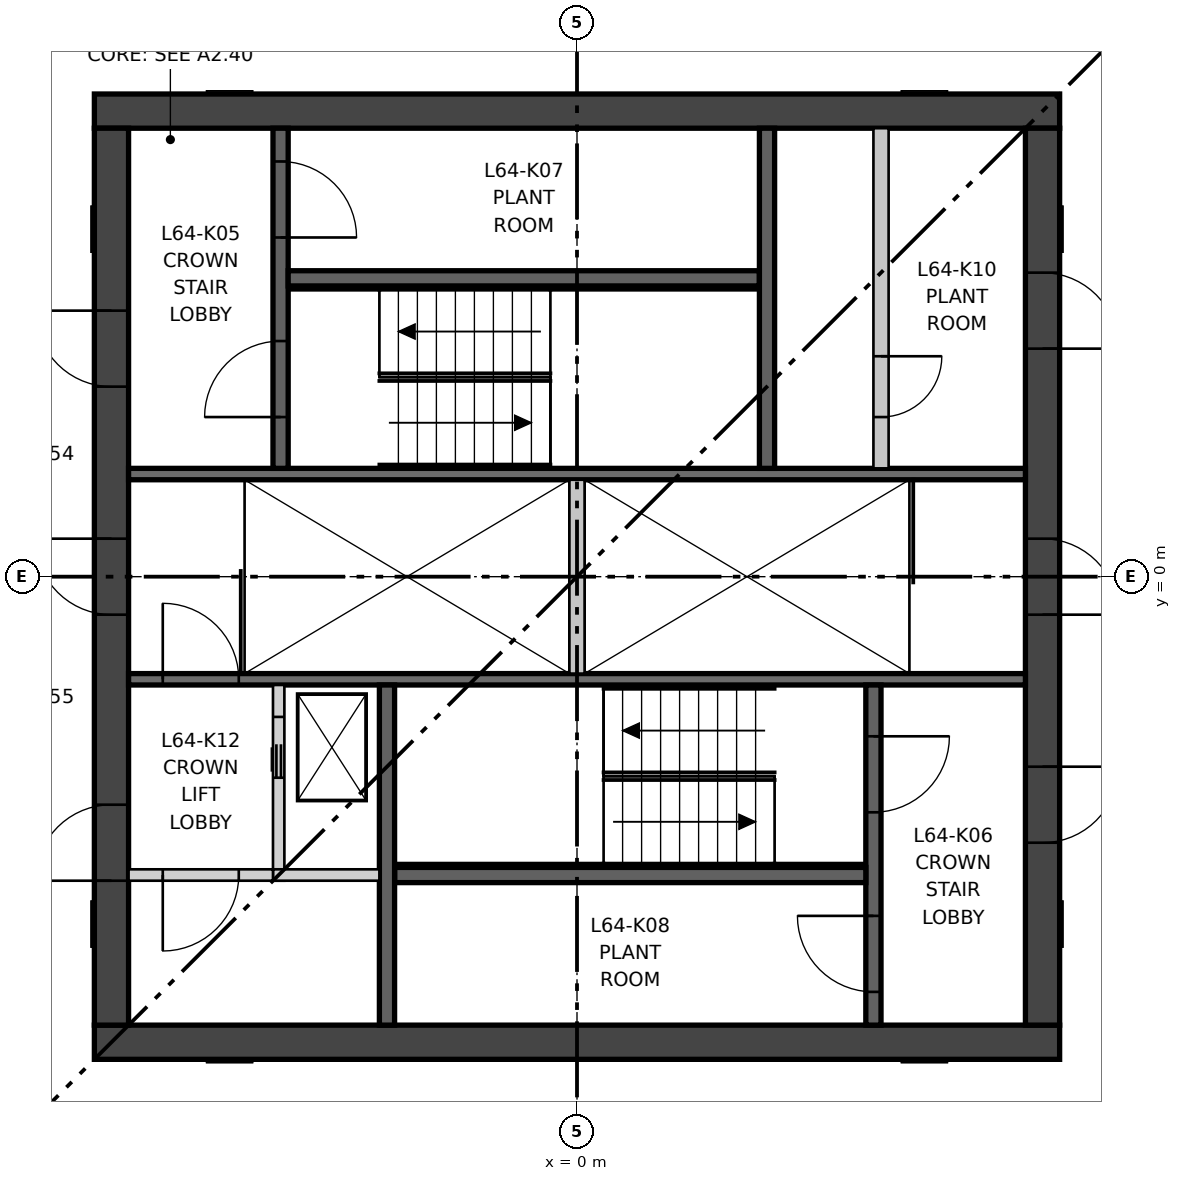
"""IFC4 building model, lengths in metres.
Left out: names, types, materials, properties, quantities, classifications, styles, units other than length and angle.
Written with IfcOpenShell. Run it as: python <this file> out.ifc"""

import sys

from ifc_helpers import new_model, si_unit, direction, frame, frame_2d, origin, place, context, subcontext, project, spatial, rectangle, extrude, element, fill, save


model = new_model("IFC4")
c1 = context("Model", 3, precision=1e-05, world=origin(), true_north=direction((0.0, 1.0)))
c2 = subcontext(c1, "Body", "Model", "MODEL_VIEW")
j1 = project(units=[si_unit("LENGTHUNIT", "METRE"), si_unit("PLANEANGLEUNIT", "RADIAN")], contexts=[c1])
p1 = place(None, origin())
s1 = spatial("IfcSite", under=j1, at=p1, CompositionType="ELEMENT")
p2 = place(p1, origin())
s2 = spatial("IfcBuilding", under=s1, at=p2, CompositionType="ELEMENT")
p3 = place(p2, frame((0.0, 0.0, 235.4)))
s3 = spatial("IfcBuildingStorey", under=s2, at=p3, CompositionType="ELEMENT", Elevation=235.4)
for number, where, z_axis, x_axis in (
    (1, (-6.35, -6.125, 0.0), (0.0, 0.0, 1.0), (1.0, 0.0, 0.0)),
    (2, (-6.35, 6.125, 0.0), (0.0, 0.0, 1.0), (1.0, 0.0, 0.0)),
):
    element("IfcWall", number, at=place(p3, frame(where, z_axis=z_axis, x_axis=x_axis)), inside=s3, PredefinedType="SHEAR", context=c2, shape_type="SweptSolid", body=[
        extrude(rectangle(XDim=12.7, YDim=0.45, at=frame_2d((6.35, 0.0))), origin(), (0.0, 0.0, 1.0), 3.4),
    ])
p4 = place(p3, frame((-6.125, -5.9, 0.0), z_axis=(0.0, 0.0, 1.0), x_axis=(0.0, 1.0, 0.0)))
e3 = element("IfcWall", 3, at=p4, inside=s3, PredefinedType="SHEAR", context=c2, shape_type="SweptSolid", body=[
    extrude(rectangle(XDim=11.8, YDim=0.45, at=frame_2d((5.9, 0.0))), origin(), (0.0, 0.0, 1.0), 3.4),
])
p5 = place(p4, frame((5.4, 0.0, 0.0)))
e4 = element("IfcOpeningElement", 4, at=p5, cuts=e3, PredefinedType="OPENING", context=c2, shape_type="SweptSolid", body=[
    extrude(rectangle(XDim=1.0, YDim=2.1, at=frame_2d((0.5, 1.05))), frame((0.0, 0.235, 0.0), z_axis=(0.0, -1.0, 0.0), x_axis=(1.0, 0.0, 0.0)), (0.0, 0.0, 1.0), 0.47),
])
p6 = place(p4, frame((8.4, 0.0, 0.0)))
e5 = element("IfcOpeningElement", 5, at=p6, cuts=e3, PredefinedType="OPENING", context=c2, shape_type="SweptSolid", body=[
    extrude(rectangle(XDim=1.0, YDim=2.1, at=frame_2d((0.5, 1.05))), frame((0.0, 0.235, 0.0), z_axis=(0.0, -1.0, 0.0), x_axis=(1.0, 0.0, 0.0)), (0.0, 0.0, 1.0), 0.47),
])
p7 = place(p4, frame((1.9, 0.0, 0.0)))
e6 = element("IfcOpeningElement", 6, at=p7, cuts=e3, PredefinedType="OPENING", context=c2, shape_type="SweptSolid", body=[
    extrude(rectangle(XDim=1.0, YDim=2.1, at=frame_2d((0.5, 1.05))), frame((0.0, 0.235, 0.0), z_axis=(0.0, -1.0, 0.0), x_axis=(1.0, 0.0, 0.0)), (0.0, 0.0, 1.0), 0.47),
])
p8 = place(p3, frame((6.125, -5.9, 0.0), z_axis=(0.0, 0.0, 1.0), x_axis=(0.0, 1.0, 0.0)))
e7 = element("IfcWall", 7, at=p8, inside=s3, PredefinedType="SHEAR", context=c2, shape_type="SweptSolid", body=[
    extrude(rectangle(XDim=11.8, YDim=0.45, at=frame_2d((5.9, 0.0))), origin(), (0.0, 0.0, 1.0), 3.4),
])
p9 = place(p8, frame((5.4, 0.0, 0.0)))
e8 = element("IfcOpeningElement", 8, at=p9, cuts=e7, PredefinedType="OPENING", context=c2, shape_type="SweptSolid", body=[
    extrude(rectangle(XDim=1.0, YDim=2.1, at=frame_2d((0.5, 1.05))), frame((0.0, 0.235, 0.0), z_axis=(0.0, -1.0, 0.0), x_axis=(1.0, 0.0, 0.0)), (0.0, 0.0, 1.0), 0.47),
])
p10 = place(p8, frame((2.4, 0.0, 0.0)))
e9 = element("IfcOpeningElement", 9, at=p10, cuts=e7, PredefinedType="OPENING", context=c2, shape_type="SweptSolid", body=[
    extrude(rectangle(XDim=1.0, YDim=2.1, at=frame_2d((0.5, 1.05))), frame((0.0, 0.235, 0.0), z_axis=(0.0, -1.0, 0.0), x_axis=(1.0, 0.0, 0.0)), (0.0, 0.0, 1.0), 0.47),
])
p11 = place(p8, frame((8.9, 0.0, 0.0)))
e10 = element("IfcOpeningElement", 10, at=p11, cuts=e7, PredefinedType="OPENING", context=c2, shape_type="SweptSolid", body=[
    extrude(rectangle(XDim=1.0, YDim=2.1, at=frame_2d((0.5, 1.05))), frame((0.0, 0.235, 0.0), z_axis=(0.0, -1.0, 0.0), x_axis=(1.0, 0.0, 0.0)), (0.0, 0.0, 1.0), 0.47),
])
p12 = place(p3, frame((-5.9, -1.35, 0.0), z_axis=(0.0, 0.0, 1.0), x_axis=(1.0, 0.0, 0.0)))
e11 = element("IfcWall", 11, at=p12, inside=s3, PredefinedType="SHEAR", context=c2, shape_type="SweptSolid", body=[
    extrude(rectangle(XDim=11.8, YDim=0.15, at=frame_2d((5.9, 0.0))), origin(), (0.0, 0.0, 1.0), 3.4),
])
p13 = place(p12, frame((0.45, 0.0, 0.0)))
e12 = element("IfcOpeningElement", 12, at=p13, cuts=e11, PredefinedType="OPENING", context=c2, shape_type="SweptSolid", body=[
    extrude(rectangle(XDim=1.0, YDim=2.1, at=frame_2d((0.5, 1.05))), frame((0.0, 0.085, 0.0), z_axis=(0.0, -1.0, 0.0), x_axis=(1.0, 0.0, 0.0)), (0.0, 0.0, 1.0), 0.17),
])
p14 = place(p3, frame((-5.9, 1.35, 0.0), z_axis=(0.0, 0.0, 1.0), x_axis=(1.0, 0.0, 0.0)))
e13 = element("IfcWall", 13, at=p14, inside=s3, PredefinedType="SHEAR", context=c2, shape_type="SweptSolid", body=[
    extrude(rectangle(XDim=11.8, YDim=0.15, at=frame_2d((5.9, 0.0))), origin(), (0.0, 0.0, 1.0), 3.4),
])
p15 = place(p3, frame((0.0, -1.275, 0.0), z_axis=(0.0, 0.0, 1.0), x_axis=(0.0, 1.0, 0.0)))
e14 = element("IfcWall", 14, at=p15, inside=s3, PredefinedType="PARTITIONING", context=c2, shape_type="SweptSolid", body=[
    extrude(rectangle(XDim=2.55, YDim=0.2, at=frame_2d((1.275, 0.0))), origin(), (0.0, 0.0, 1.0), 3.4),
])
p16 = place(p3, frame((-3.9, 1.425, 0.0), z_axis=(0.0, 0.0, 1.0), x_axis=(0.0, 1.0, 0.0)))
e15 = element("IfcWall", 15, at=p16, inside=s3, PredefinedType="SHEAR", context=c2, shape_type="SweptSolid", body=[
    extrude(rectangle(XDim=4.475, YDim=0.2, at=frame_2d((2.237, 0.0))), origin(), (0.0, 0.0, 1.0), 3.4),
])
p17 = place(p16, frame((0.675, 0.0, 0.0)))
e16 = element("IfcOpeningElement", 16, at=p17, cuts=e15, PredefinedType="OPENING", context=c2, shape_type="SweptSolid", body=[
    extrude(rectangle(XDim=1.0, YDim=2.1, at=frame_2d((0.5, 1.05))), frame((0.0, 0.11, 0.0), z_axis=(0.0, -1.0, 0.0), x_axis=(1.0, 0.0, 0.0)), (0.0, 0.0, 1.0), 0.22),
])
p18 = place(p16, frame((3.038, 0.0, 0.0)))
e17 = element("IfcOpeningElement", 17, at=p18, cuts=e15, PredefinedType="OPENING", context=c2, shape_type="SweptSolid", body=[
    extrude(rectangle(XDim=1.0, YDim=2.1, at=frame_2d((0.5, 1.05))), frame((0.0, 0.11, 0.0), z_axis=(0.0, -1.0, 0.0), x_axis=(1.0, 0.0, 0.0)), (0.0, 0.0, 1.0), 0.22),
])
p19 = place(p3, frame((-3.8, 3.925, 0.0), z_axis=(0.0, 0.0, 1.0), x_axis=(1.0, 0.0, 0.0)))
e18 = element("IfcWall", 18, at=p19, inside=s3, PredefinedType="SHEAR", context=c2, shape_type="SweptSolid", body=[
    extrude(rectangle(XDim=6.2, YDim=0.2, at=frame_2d((3.1, 0.0))), origin(), (0.0, 0.0, 1.0), 3.4),
])
p20 = place(p3, frame((2.5, 1.425, 0.0), z_axis=(0.0, 0.0, 1.0), x_axis=(0.0, 1.0, 0.0)))
e19 = element("IfcWall", 19, at=p20, inside=s3, PredefinedType="SHEAR", context=c2, shape_type="SweptSolid", body=[
    extrude(rectangle(XDim=4.475, YDim=0.2, at=frame_2d((2.237, 0.0))), origin(), (0.0, 0.0, 1.0), 3.4),
])
p21 = place(p3, frame((3.9, -1.425, 0.0), z_axis=(0.0, 0.0, 1.0), x_axis=(0.0, -1.0, 0.0)))
e20 = element("IfcWall", 20, at=p21, inside=s3, PredefinedType="SHEAR", context=c2, shape_type="SweptSolid", body=[
    extrude(rectangle(XDim=4.475, YDim=0.2, at=frame_2d((2.237, 0.0))), origin(), (0.0, 0.0, 1.0), 3.4),
])
p22 = place(p21, frame((0.675, 0.0, 0.0)))
e21 = element("IfcOpeningElement", 21, at=p22, cuts=e20, PredefinedType="OPENING", context=c2, shape_type="SweptSolid", body=[
    extrude(rectangle(XDim=1.0, YDim=2.1, at=frame_2d((0.5, 1.05))), frame((0.0, 0.11, 0.0), z_axis=(0.0, -1.0, 0.0), x_axis=(1.0, 0.0, 0.0)), (0.0, 0.0, 1.0), 0.22),
])
p23 = place(p21, frame((3.038, 0.0, 0.0)))
e22 = element("IfcOpeningElement", 22, at=p23, cuts=e20, PredefinedType="OPENING", context=c2, shape_type="SweptSolid", body=[
    extrude(rectangle(XDim=1.0, YDim=2.1, at=frame_2d((0.5, 1.05))), frame((0.0, 0.11, 0.0), z_axis=(0.0, -1.0, 0.0), x_axis=(1.0, 0.0, 0.0)), (0.0, 0.0, 1.0), 0.22),
])
p24 = place(p3, frame((3.8, -3.925, 0.0), z_axis=(0.0, 0.0, 1.0), x_axis=(-1.0, 0.0, 0.0)))
e23 = element("IfcWall", 23, at=p24, inside=s3, PredefinedType="SHEAR", context=c2, shape_type="SweptSolid", body=[
    extrude(rectangle(XDim=6.2, YDim=0.2, at=frame_2d((3.1, 0.0))), origin(), (0.0, 0.0, 1.0), 3.4),
])
p25 = place(p3, frame((-2.5, -1.425, 0.0), z_axis=(0.0, 0.0, 1.0), x_axis=(0.0, -1.0, 0.0)))
e24 = element("IfcWall", 24, at=p25, inside=s3, PredefinedType="SHEAR", context=c2, shape_type="SweptSolid", body=[
    extrude(rectangle(XDim=4.475, YDim=0.2, at=frame_2d((2.237, 0.0))), origin(), (0.0, 0.0, 1.0), 3.4),
])
p26 = place(p3, frame((4.0, 1.425, 0.0), z_axis=(0.0, 0.0, 1.0), x_axis=(0.0, 1.0, 0.0)))
e25 = element("IfcWall", 25, at=p26, inside=s3, PredefinedType="PARTITIONING", context=c2, shape_type="SweptSolid", body=[
    extrude(rectangle(XDim=4.475, YDim=0.2, at=frame_2d((2.237, 0.0))), origin(), (0.0, 0.0, 1.0), 3.4),
])
p27 = place(p26, frame((0.675, 0.0, 0.0)))
e26 = element("IfcOpeningElement", 26, at=p27, cuts=e25, PredefinedType="OPENING", context=c2, shape_type="SweptSolid", body=[
    extrude(rectangle(XDim=0.8, YDim=2.1, at=frame_2d((0.4, 1.05))), frame((0.0, 0.11, 0.0), z_axis=(0.0, -1.0, 0.0), x_axis=(1.0, 0.0, 0.0)), (0.0, 0.0, 1.0), 0.22),
])
p28 = place(p3, frame((-3.925, -4.0, 0.0), z_axis=(0.0, 0.0, 1.0), x_axis=(0.0, 1.0, 0.0)))
e27 = element("IfcWall", 27, at=p28, inside=s3, PredefinedType="PARTITIONING", context=c2, shape_type="SweptSolid", body=[
    extrude(rectangle(XDim=2.575, YDim=0.15, at=frame_2d((1.288, 0.0))), origin(), (0.0, 0.0, 1.0), 3.4),
])
p29 = place(p28, frame((1.355, 0.0, 0.0)))
e28 = element("IfcOpeningElement", 28, at=p29, cuts=e27, PredefinedType="OPENING", context=c2, shape_type="SweptSolid", body=[
    extrude(rectangle(XDim=0.8, YDim=2.1, at=frame_2d((0.4, 1.05))), frame((0.0, 0.085, 0.0), z_axis=(0.0, -1.0, 0.0), x_axis=(1.0, 0.0, 0.0)), (0.0, 0.0, 1.0), 0.17),
])
p30 = place(p3, frame((-4.0, -3.925, 0.0), z_axis=(0.0, 0.0, 1.0), x_axis=(1.0, 0.0, 0.0)))
e29 = element("IfcWall", 29, at=p30, inside=s3, PredefinedType="PARTITIONING", context=c2, shape_type="SweptSolid", body=[
    extrude(rectangle(XDim=1.4, YDim=0.15, at=frame_2d((0.7, 0.0))), origin(), (0.0, 0.0, 1.0), 3.4),
])
p31 = place(p3, frame((-5.9, -3.925, 0.0), z_axis=(0.0, 0.0, 1.0), x_axis=(1.0, 0.0, 0.0)))
e30 = element("IfcWall", 30, at=p31, inside=s3, PredefinedType="PARTITIONING", context=c2, shape_type="SweptSolid", body=[
    extrude(rectangle(XDim=1.9, YDim=0.15, at=frame_2d((0.95, 0.0))), origin(), (0.0, 0.0, 1.0), 3.4),
])
p32 = place(p31, frame((0.45, 0.0, 0.0)))
e31 = element("IfcOpeningElement", 31, at=p32, cuts=e30, PredefinedType="OPENING", context=c2, shape_type="SweptSolid", body=[
    extrude(rectangle(XDim=1.0, YDim=2.1, at=frame_2d((0.5, 1.05))), frame((0.0, 0.085, 0.0), z_axis=(0.0, -1.0, 0.0), x_axis=(1.0, 0.0, 0.0)), (0.0, 0.0, 1.0), 0.17),
])
p33 = place(p29, origin())
e32 = element("IfcDoor", 32, at=p33, inside=s3, OperationType="DOUBLE_DOOR_SLIDING", PredefinedType="DOOR", context=c2, shape_type="SweptSolid", body=[
    extrude(rectangle(XDim=0.8, YDim=2.1, at=frame_2d((0.4, 1.05))), frame((0.0, 0.025, 0.0), z_axis=(0.0, -1.0, 0.0), x_axis=(1.0, 0.0, 0.0)), (0.0, 0.0, 1.0), 0.05),
])
fill(e28, e32)
p34 = place(p13, origin())
e33 = element("IfcDoor", 33, at=p34, inside=s3, OperationType="SINGLE_SWING_LEFT", PredefinedType="DOOR", context=c2, shape_type="SweptSolid", body=[
    extrude(rectangle(XDim=1.0, YDim=2.1, at=frame_2d((0.5, 1.05))), frame((0.0, 0.025, 0.0), z_axis=(0.0, -1.0, 0.0), x_axis=(1.0, 0.0, 0.0)), (0.0, 0.0, 1.0), 0.05),
])
fill(e12, e33)
p35 = place(p32, frame((1.0, 0.0, 0.0), z_axis=(0.0, 0.0, 1.0), x_axis=(-1.0, 0.0, 0.0)))
e34 = element("IfcDoor", 34, at=p35, inside=s3, OperationType="SINGLE_SWING_LEFT", PredefinedType="DOOR", context=c2, shape_type="SweptSolid", body=[
    extrude(rectangle(XDim=1.0, YDim=2.1, at=frame_2d((0.5, 1.05))), frame((0.0, 0.025, 0.0), z_axis=(0.0, -1.0, 0.0), x_axis=(1.0, 0.0, 0.0)), (0.0, 0.0, 1.0), 0.05),
])
fill(e31, e34)
p36 = place(p17, origin())
e35 = element("IfcDoor", 35, at=p36, inside=s3, OperationType="SINGLE_SWING_LEFT", PredefinedType="DOOR", context=c2, shape_type="SweptSolid", body=[
    extrude(rectangle(XDim=1.0, YDim=2.1, at=frame_2d((0.5, 1.05))), frame((0.0, 0.025, 0.0), z_axis=(0.0, -1.0, 0.0), x_axis=(1.0, 0.0, 0.0)), (0.0, 0.0, 1.0), 0.05),
])
fill(e16, e35)
p37 = place(p22, origin())
e36 = element("IfcDoor", 36, at=p37, inside=s3, OperationType="SINGLE_SWING_LEFT", PredefinedType="DOOR", context=c2, shape_type="SweptSolid", body=[
    extrude(rectangle(XDim=1.0, YDim=2.1, at=frame_2d((0.5, 1.05))), frame((0.0, 0.025, 0.0), z_axis=(0.0, -1.0, 0.0), x_axis=(1.0, 0.0, 0.0)), (0.0, 0.0, 1.0), 0.05),
])
fill(e21, e36)
p38 = place(p18, frame((1.0, 0.0, 0.0), z_axis=(0.0, 0.0, 1.0), x_axis=(-1.0, 0.0, 0.0)))
e37 = element("IfcDoor", 37, at=p38, inside=s3, OperationType="SINGLE_SWING_LEFT", PredefinedType="DOOR", context=c2, shape_type="SweptSolid", body=[
    extrude(rectangle(XDim=1.0, YDim=2.1, at=frame_2d((0.5, 1.05))), frame((0.0, 0.025, 0.0), z_axis=(0.0, -1.0, 0.0), x_axis=(1.0, 0.0, 0.0)), (0.0, 0.0, 1.0), 0.05),
])
fill(e17, e37)
p39 = place(p23, frame((1.0, 0.0, 0.0), z_axis=(0.0, 0.0, 1.0), x_axis=(-1.0, 0.0, 0.0)))
e38 = element("IfcDoor", 38, at=p39, inside=s3, OperationType="SINGLE_SWING_LEFT", PredefinedType="DOOR", context=c2, shape_type="SweptSolid", body=[
    extrude(rectangle(XDim=1.0, YDim=2.1, at=frame_2d((0.5, 1.05))), frame((0.0, 0.025, 0.0), z_axis=(0.0, -1.0, 0.0), x_axis=(1.0, 0.0, 0.0)), (0.0, 0.0, 1.0), 0.05),
])
fill(e22, e38)
p40 = place(p27, frame((0.8, 0.0, 0.0), z_axis=(0.0, 0.0, 1.0), x_axis=(-1.0, 0.0, 0.0)))
e39 = element("IfcDoor", 39, at=p40, inside=s3, OperationType="SINGLE_SWING_RIGHT", PredefinedType="DOOR", context=c2, shape_type="SweptSolid", body=[
    extrude(rectangle(XDim=0.8, YDim=2.1, at=frame_2d((0.4, 1.05))), frame((0.0, 0.025, 0.0), z_axis=(0.0, -1.0, 0.0), x_axis=(1.0, 0.0, 0.0)), (0.0, 0.0, 1.0), 0.05),
])
fill(e26, e39)
p41 = place(p5, origin())
e40 = element("IfcDoor", 40, at=p41, inside=s3, OperationType="SINGLE_SWING_RIGHT", PredefinedType="DOOR", context=c2, shape_type="SweptSolid", body=[
    extrude(rectangle(XDim=1.0, YDim=2.1, at=frame_2d((0.5, 1.05))), frame((0.0, 0.025, 0.0), z_axis=(0.0, -1.0, 0.0), x_axis=(1.0, 0.0, 0.0)), (0.0, 0.0, 1.0), 0.05),
])
fill(e4, e40)
p42 = place(p9, frame((1.0, 0.0, 0.0), z_axis=(0.0, 0.0, 1.0), x_axis=(-1.0, 0.0, 0.0)))
e41 = element("IfcDoor", 41, at=p42, inside=s3, OperationType="SINGLE_SWING_LEFT", PredefinedType="DOOR", context=c2, shape_type="SweptSolid", body=[
    extrude(rectangle(XDim=1.0, YDim=2.1, at=frame_2d((0.5, 1.05))), frame((0.0, 0.025, 0.0), z_axis=(0.0, -1.0, 0.0), x_axis=(1.0, 0.0, 0.0)), (0.0, 0.0, 1.0), 0.05),
])
fill(e8, e41)
p43 = place(p6, origin())
e42 = element("IfcDoor", 42, at=p43, inside=s3, OperationType="SINGLE_SWING_RIGHT", PredefinedType="DOOR", context=c2, shape_type="SweptSolid", body=[
    extrude(rectangle(XDim=1.0, YDim=2.1, at=frame_2d((0.5, 1.05))), frame((0.0, 0.025, 0.0), z_axis=(0.0, -1.0, 0.0), x_axis=(1.0, 0.0, 0.0)), (0.0, 0.0, 1.0), 0.05),
])
fill(e5, e42)
p44 = place(p10, frame((1.0, 0.0, 0.0), z_axis=(0.0, 0.0, 1.0), x_axis=(-1.0, 0.0, 0.0)))
e43 = element("IfcDoor", 43, at=p44, inside=s3, OperationType="SINGLE_SWING_RIGHT", PredefinedType="DOOR", context=c2, shape_type="SweptSolid", body=[
    extrude(rectangle(XDim=1.0, YDim=2.1, at=frame_2d((0.5, 1.05))), frame((0.0, 0.025, 0.0), z_axis=(0.0, -1.0, 0.0), x_axis=(1.0, 0.0, 0.0)), (0.0, 0.0, 1.0), 0.05),
])
fill(e9, e43)
p45 = place(p11, frame((1.0, 0.0, 0.0), z_axis=(0.0, 0.0, 1.0), x_axis=(-1.0, 0.0, 0.0)))
e44 = element("IfcDoor", 44, at=p45, inside=s3, OperationType="SINGLE_SWING_LEFT", PredefinedType="DOOR", context=c2, shape_type="SweptSolid", body=[
    extrude(rectangle(XDim=1.0, YDim=2.1, at=frame_2d((0.5, 1.05))), frame((0.0, 0.025, 0.0), z_axis=(0.0, -1.0, 0.0), x_axis=(1.0, 0.0, 0.0)), (0.0, 0.0, 1.0), 0.05),
])
fill(e10, e44)
p46 = place(p7, origin())
e45 = element("IfcDoor", 45, at=p46, inside=s3, OperationType="SINGLE_SWING_LEFT", PredefinedType="DOOR", context=c2, shape_type="SweptSolid", body=[
    extrude(rectangle(XDim=1.0, YDim=2.1, at=frame_2d((0.5, 1.05))), frame((0.0, 0.025, 0.0), z_axis=(0.0, -1.0, 0.0), x_axis=(1.0, 0.0, 0.0)), (0.0, 0.0, 1.0), 0.05),
])
fill(e6, e45)
save(model, sys.argv[1])
